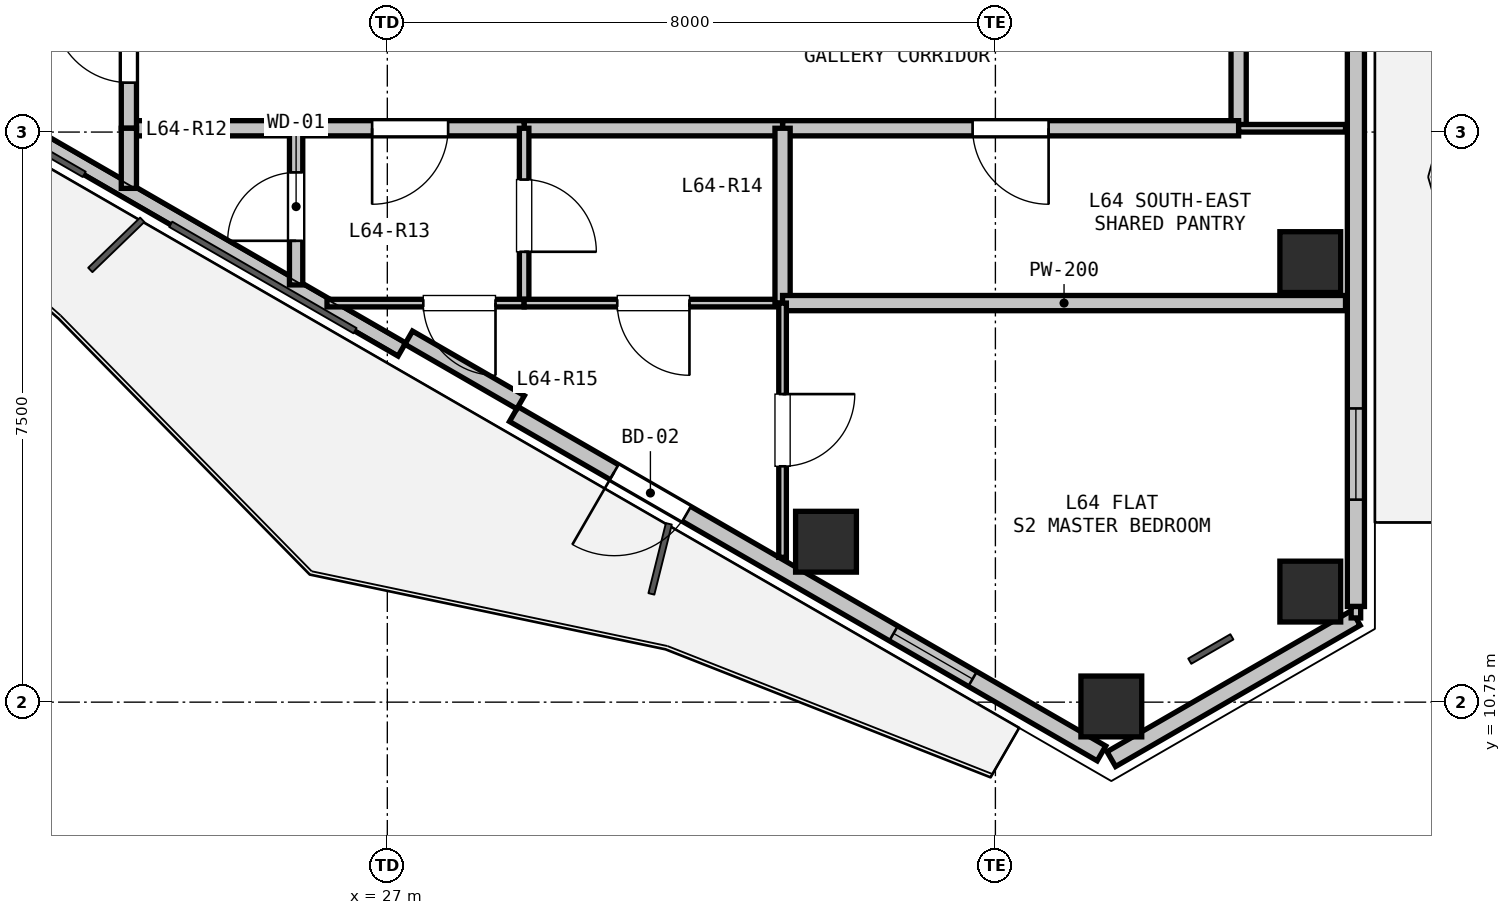
"""IFC4 building model, lengths in metres.
Left out: names, types, materials, properties, quantities, classifications, styles, units other than length and angle.
Written with IfcOpenShell. Run it as: python <this file> out.ifc"""

import sys

from ifc_helpers import new_model, si_unit, direction, frame, frame_2d, origin, origin_2d, place, context, subcontext, project, spatial, rectangle, hollow_rectangle, extrude, element, fill, save


model = new_model("IFC4")
c1 = context("Model", 3, precision=1e-05, world=origin(), true_north=direction((0.0, 1.0)))
c2 = subcontext(c1, "Body", "Model", "MODEL_VIEW")
j1 = project(units=[si_unit("LENGTHUNIT", "METRE"), si_unit("PLANEANGLEUNIT", "RADIAN")], contexts=[c1])
p1 = place(None, origin())
s1 = spatial("IfcSite", under=j1, at=p1, CompositionType="ELEMENT")
p2 = place(p1, origin())
s2 = spatial("IfcBuilding", under=s1, at=p2, CompositionType="ELEMENT")
p3 = place(p2, frame((0.0, 0.0, 229.8)))
s3 = spatial("IfcBuildingStorey", under=s2, at=p3, CompositionType="ELEMENT", Elevation=229.8)
for number, where, z_axis, x_axis in (
    (1, (39.143, 16.539, 0.0), (0.0, 0.0, 1.0), (1.0, 0.0, 0.0)),
    (2, (39.143, 12.205, 0.0), (0.0, 0.0, 1.0), (1.0, 0.0, 0.0)),
    (3, (36.525, 10.693, 0.0), (0.0, 0.0, 1.0), (1.0, 0.0, 0.0)),
    (4, (32.771, 12.861, 0.0), (0.0, 0.0, 1.0), (1.0, 0.0, 0.0)),
):
    element("IfcColumn", number, at=place(p3, frame(where, z_axis=z_axis, x_axis=x_axis)), inside=s3, PredefinedType="COLUMN", context=c2, shape_type="SweptSolid", body=[
        extrude(hollow_rectangle(XDim=0.8, YDim=0.8, WallThickness=0.025, at=origin_2d()), origin(), (0.0, 0.0, 1.0), 3.3),
    ])
p4 = place(p3, frame((39.743, 11.858, 0.0), z_axis=(0.0, 0.0, 1.0), x_axis=(-0.866038962515, -0.499976514854, 0.0)))
e5 = element("IfcWall", 5, at=p4, inside=s3, PredefinedType="SOLIDWALL", context=c2, shape_type="SweptSolid", body=[
    extrude(rectangle(XDim=3.716, YDim=0.225, at=frame_2d((1.858, 0.0))), origin(), (0.0, 0.0, 1.0), 2.7),
])
p5 = place(p3, frame((39.743, 20.936, 0.0), z_axis=(0.0, 0.0, 1.0), x_axis=(0.0, -1.0, 0.0)))
e6 = element("IfcWall", 6, at=p5, inside=s3, PredefinedType="SOLIDWALL", context=c2, shape_type="SweptSolid", body=[
    extrude(rectangle(XDim=8.928, YDim=0.225, at=frame_2d((4.464, 0.0))), origin(), (0.0, 0.0, 1.0), 2.7),
])
p6 = place(p5, frame((6.322, 0.0, 0.9)))
e7 = element("IfcOpeningElement", 7, at=p6, cuts=e6, PredefinedType="OPENING", context=c2, shape_type="SweptSolid", body=[
    extrude(rectangle(XDim=1.2, YDim=1.4, at=frame_2d((0.6, 0.7))), frame((0.0, 0.123, 0.0), z_axis=(0.0, -1.0, 0.0), x_axis=(1.0, 0.0, 0.0)), (0.0, 0.0, 1.0), 0.245),
])
p7 = place(p3, frame((36.395, 10.076, 0.0), z_axis=(0.0, 0.0, 1.0), x_axis=(-0.866026655105, 0.499997832642, 0.0)))
e8 = element("IfcWall", 8, at=p7, inside=s3, PredefinedType="SOLIDWALL", context=c2, shape_type="SweptSolid", body=[
    extrude(rectangle(XDim=8.928, YDim=0.225, at=frame_2d((4.464, 0.0))), origin(), (0.0, 0.0, 1.0), 2.7),
])
p8 = place(p7, frame((6.302, 0.0, 0.0)))
e9 = element("IfcOpeningElement", 9, at=p8, cuts=e8, PredefinedType="OPENING", context=c2, shape_type="SweptSolid", body=[
    extrude(rectangle(XDim=1.1, YDim=2.1, at=frame_2d((0.55, 1.05))), frame((0.0, 0.123, 0.0), z_axis=(0.0, -1.0, 0.0), x_axis=(1.0, 0.0, 0.0)), (0.0, 0.0, 1.0), 0.245),
])
p9 = place(p7, frame((1.958, 0.0, 0.9)))
e10 = element("IfcOpeningElement", 10, at=p9, cuts=e8, PredefinedType="OPENING", context=c2, shape_type="SweptSolid", body=[
    extrude(rectangle(XDim=1.2, YDim=1.4, at=frame_2d((0.6, 0.7))), frame((0.0, 0.123, 0.0), z_axis=(0.0, -1.0, 0.0), x_axis=(1.0, 0.0, 0.0)), (0.0, 0.0, 1.0), 0.245),
])
p10 = place(p3, frame((27.191, 15.389, 0.0), z_axis=(0.0, 0.0, 1.0), x_axis=(-0.866019557082, 0.500010126649, 0.0)))
e11 = element("IfcWall", 11, at=p10, inside=s3, PredefinedType="PARAPET", context=c2, shape_type="SweptSolid", body=[
    extrude(rectangle(XDim=8.228, YDim=0.2, at=frame_2d((4.114, 0.0))), origin(), (0.0, 0.0, 1.0), 0.2),
])
p11 = place(p3, frame((28.754, 14.695, 0.0), z_axis=(0.0, 0.0, 1.0), x_axis=(-0.866025371046, 0.500000056704, 0.0)))
e12 = element("IfcWall", 12, at=p11, inside=s3, PredefinedType="PARAPET", context=c2, shape_type="SweptSolid", body=[
    extrude(rectangle(XDim=1.7, YDim=0.2, at=frame_2d((0.85, 0.0))), origin(), (0.0, 0.0, 1.0), 2.7),
])
p12 = place(p3, frame((38.2, 20.75, 0.0), z_axis=(0.0, 0.0, 1.0), x_axis=(0.0, -1.0, 0.0)))
e13 = element("IfcWall", 13, at=p12, inside=s3, PredefinedType="PARTITIONING", context=c2, shape_type="SweptSolid", body=[
    extrude(rectangle(XDim=2.45, YDim=0.2, at=frame_2d((1.225, 0.0))), origin(), (0.0, 0.0, 1.0), 3.08),
])
p13 = place(p3, frame((38.2, 18.3, 0.0), z_axis=(0.0, 0.0, 1.0), x_axis=(-1.0, 0.0, 0.0)))
e14 = element("IfcWall", 14, at=p13, inside=s3, PredefinedType="PARTITIONING", context=c2, shape_type="SweptSolid", body=[
    extrude(rectangle(XDim=6.0, YDim=0.2, at=frame_2d((3.0, 0.0))), origin(), (0.0, 0.0, 1.0), 2.528),
])
p14 = place(p13, frame((2.5, 0.0, 0.0)))
e15 = element("IfcOpeningElement", 15, at=p14, cuts=e14, PredefinedType="OPENING", context=c2, shape_type="SweptSolid", body=[
    extrude(rectangle(XDim=1.0, YDim=2.15, at=frame_2d((0.5, 1.075))), frame((0.0, 0.11, 0.0), z_axis=(0.0, -1.0, 0.0), x_axis=(1.0, 0.0, 0.0)), (0.0, 0.0, 1.0), 0.22),
])
p15 = place(p3, frame((32.2, 18.3, 0.0), z_axis=(0.0, 0.0, 1.0), x_axis=(-1.0, 0.0, 0.0)))
e16 = element("IfcWall", 16, at=p15, inside=s3, PredefinedType="PARTITIONING", context=c2, shape_type="SweptSolid", body=[
    extrude(rectangle(XDim=3.4, YDim=0.2, at=frame_2d((1.7, 0.0))), origin(), (0.0, 0.0, 1.0), 3.08),
])
p16 = place(p3, frame((28.8, 18.3, 0.0), z_axis=(0.0, 0.0, 1.0), x_axis=(-1.0, 0.0, 0.0)))
e17 = element("IfcWall", 17, at=p16, inside=s3, PredefinedType="PARTITIONING", context=c2, shape_type="SweptSolid", body=[
    extrude(rectangle(XDim=3.0, YDim=0.2, at=frame_2d((1.5, 0.0))), origin(), (0.0, 0.0, 1.0), 3.08),
])
p17 = place(p16, frame((1.0, 0.0, 0.0)))
e18 = element("IfcOpeningElement", 18, at=p17, cuts=e17, PredefinedType="OPENING", context=c2, shape_type="SweptSolid", body=[
    extrude(rectangle(XDim=1.0, YDim=2.15, at=frame_2d((0.5, 1.075))), frame((0.0, 0.11, 0.0), z_axis=(0.0, -1.0, 0.0), x_axis=(1.0, 0.0, 0.0)), (0.0, 0.0, 1.0), 0.22),
])
p18 = place(p3, frame((25.8, 18.3, 0.0), z_axis=(0.0, 0.0, 1.0), x_axis=(-1.0, 0.0, 0.0)))
e19 = element("IfcWall", 19, at=p18, inside=s3, PredefinedType="PARTITIONING", context=c2, shape_type="SweptSolid", body=[
    extrude(rectangle(XDim=2.2, YDim=0.2, at=frame_2d((1.1, 0.0))), origin(), (0.0, 0.0, 1.0), 2.365),
])
p19 = place(p3, frame((23.6, 18.3, 0.0), z_axis=(0.0, 0.0, 1.0), x_axis=(0.0, 1.0, 0.0)))
e20 = element("IfcWall", 20, at=p19, inside=s3, PredefinedType="PARTITIONING", context=c2, shape_type="SweptSolid", body=[
    extrude(rectangle(XDim=2.2, YDim=0.2, at=frame_2d((1.1, 0.0))), origin(), (0.0, 0.0, 1.0), 2.528),
])
p20 = place(p19, frame((0.6, 0.0, 0.0)))
e21 = element("IfcOpeningElement", 21, at=p20, cuts=e20, PredefinedType="OPENING", context=c2, shape_type="SweptSolid", body=[
    extrude(rectangle(XDim=1.0, YDim=2.15, at=frame_2d((0.5, 1.075))), frame((0.0, 0.11, 0.0), z_axis=(0.0, -1.0, 0.0), x_axis=(1.0, 0.0, 0.0)), (0.0, 0.0, 1.0), 0.22),
])
p21 = place(p3, frame((28.8, 18.3, 0.0), z_axis=(0.0, 0.0, 1.0), x_axis=(0.0, -1.0, 0.0)))
e22 = element("IfcWall", 22, at=p21, inside=s3, PredefinedType="PARTITIONING", context=c2, shape_type="SweptSolid", body=[
    extrude(rectangle(XDim=2.3, YDim=0.125, at=frame_2d((1.15, 0.0))), origin(), (0.0, 0.0, 1.0), 3.08),
])
p22 = place(p21, frame((0.675, 0.0, 0.0)))
e23 = element("IfcOpeningElement", 23, at=p22, cuts=e22, PredefinedType="OPENING", context=c2, shape_type="SweptSolid", body=[
    extrude(rectangle(XDim=0.95, YDim=2.1, at=frame_2d((0.475, 1.05))), frame((0.0, 0.073, 0.0), z_axis=(0.0, -1.0, 0.0), x_axis=(1.0, 0.0, 0.0)), (0.0, 0.0, 1.0), 0.145),
])
p23 = place(p3, frame((28.8, 16.0, 0.0), z_axis=(0.0, 0.0, 1.0), x_axis=(-1.0, 0.0, 0.0)))
e24 = element("IfcWall", 24, at=p23, inside=s3, PredefinedType="PARTITIONING", context=c2, shape_type="SweptSolid", body=[
    extrude(rectangle(XDim=2.594, YDim=0.1, at=frame_2d((1.297, 0.0))), origin(), (0.0, 0.0, 1.0), 2.365),
])
p24 = place(p23, frame((0.377, 0.0, 0.0)))
e25 = element("IfcOpeningElement", 25, at=p24, cuts=e24, PredefinedType="OPENING", context=c2, shape_type="SweptSolid", body=[
    extrude(rectangle(XDim=0.95, YDim=2.1, at=frame_2d((0.475, 1.05))), frame((0.0, 0.06, 0.0), z_axis=(0.0, -1.0, 0.0), x_axis=(1.0, 0.0, 0.0)), (0.0, 0.0, 1.0), 0.12),
])
p25 = place(p3, frame((25.8, 16.239, 0.0), z_axis=(0.0, 0.0, 1.0), x_axis=(0.0, 1.0, 0.0)))
e26 = element("IfcWall", 26, at=p25, inside=s3, PredefinedType="PLUMBINGWALL", context=c2, shape_type="SweptSolid", body=[
    extrude(rectangle(XDim=2.061, YDim=0.175, at=frame_2d((1.031, 0.0))), origin(), (0.0, 0.0, 1.0), 2.365),
])
p26 = place(p25, frame((0.581, 0.0, 0.0)))
e27 = element("IfcOpeningElement", 27, at=p26, cuts=e26, PredefinedType="OPENING", context=c2, shape_type="SweptSolid", body=[
    extrude(rectangle(XDim=0.9, YDim=2.1, at=frame_2d((0.45, 1.05))), frame((0.0, 0.097, 0.0), z_axis=(0.0, -1.0, 0.0), x_axis=(1.0, 0.0, 0.0)), (0.0, 0.0, 1.0), 0.195),
])
p27 = place(p3, frame((23.6, 17.509, 0.0), z_axis=(0.0, 0.0, 1.0), x_axis=(0.0, 1.0, 0.0)))
e28 = element("IfcWall", 28, at=p27, inside=s3, PredefinedType="PARTITIONING", context=c2, shape_type="SweptSolid", body=[
    extrude(rectangle(XDim=0.791, YDim=0.2, at=frame_2d((0.396, 0.0))), origin(), (0.0, 0.0, 1.0), 2.365),
])
p28 = place(p3, frame((32.2, 16.0, 0.0), z_axis=(0.0, 0.0, 1.0), x_axis=(-1.0, 0.0, 0.0)))
e29 = element("IfcWall", 29, at=p28, inside=s3, PredefinedType="PARTITIONING", context=c2, shape_type="SweptSolid", body=[
    extrude(rectangle(XDim=3.4, YDim=0.1, at=frame_2d((1.7, 0.0))), origin(), (0.0, 0.0, 1.0), 3.08),
])
p29 = place(p28, frame((1.225, 0.0, 0.0)))
e30 = element("IfcOpeningElement", 30, at=p29, cuts=e29, PredefinedType="OPENING", context=c2, shape_type="SweptSolid", body=[
    extrude(rectangle(XDim=0.95, YDim=2.1, at=frame_2d((0.475, 1.05))), frame((0.0, 0.06, 0.0), z_axis=(0.0, -1.0, 0.0), x_axis=(1.0, 0.0, 0.0)), (0.0, 0.0, 1.0), 0.12),
])
p30 = place(p3, frame((32.2, 18.3, 0.0), z_axis=(0.0, 0.0, 1.0), x_axis=(0.0, -1.0, 0.0)))
e31 = element("IfcWall", 31, at=p30, inside=s3, PredefinedType="PARTITIONING", context=c2, shape_type="SweptSolid", body=[
    extrude(rectangle(XDim=2.3, YDim=0.2, at=frame_2d((1.15, 0.0))), origin(), (0.0, 0.0, 1.0), 3.08),
])
p31 = place(p3, frame((38.2, 18.3, 0.0), z_axis=(0.0, 0.0, 1.0), x_axis=(1.0, 0.0, 0.0)))
e32 = element("IfcWall", 32, at=p31, inside=s3, PredefinedType="PARTITIONING", context=c2, shape_type="SweptSolid", body=[
    extrude(rectangle(XDim=1.406, YDim=0.1, at=frame_2d((0.703, 0.0))), origin(), (0.0, 0.0, 1.0), 2.365),
])
p32 = place(p3, frame((39.606, 16.0, 0.0), z_axis=(0.0, 0.0, 1.0), x_axis=(-1.0, 0.0, 0.0)))
e33 = element("IfcWall", 33, at=p32, inside=s3, PredefinedType="PARTITIONING", context=c2, shape_type="SweptSolid", body=[
    extrude(rectangle(XDim=7.406, YDim=0.2, at=frame_2d((3.703, 0.0))), origin(), (0.0, 0.0, 1.0), 2.528),
])
p33 = place(p3, frame((32.2, 16.0, 0.0), z_axis=(0.0, 0.0, 1.0), x_axis=(0.0, -1.0, 0.0)))
e34 = element("IfcWall", 34, at=p33, inside=s3, PredefinedType="PARTITIONING", context=c2, shape_type="SweptSolid", body=[
    extrude(rectangle(XDim=3.344, YDim=0.1, at=frame_2d((1.672, 0.0))), origin(), (0.0, 0.0, 1.0), 2.365),
])
p34 = place(p33, frame((1.197, 0.0, 0.0)))
e35 = element("IfcOpeningElement", 35, at=p34, cuts=e34, PredefinedType="OPENING", context=c2, shape_type="SweptSolid", body=[
    extrude(rectangle(XDim=0.95, YDim=2.1, at=frame_2d((0.475, 1.05))), frame((0.0, 0.06, 0.0), z_axis=(0.0, -1.0, 0.0), x_axis=(1.0, 0.0, 0.0)), (0.0, 0.0, 1.0), 0.12),
])
p35 = place(p3, frame((39.743, 12.008, 0.0), z_axis=(0.0, 0.0, 1.0), x_axis=(0.0, -1.0, 0.0)))
e36 = element("IfcWall", 36, at=p35, inside=s3, PredefinedType="PARTITIONING", context=c2, shape_type="SweptSolid", body=[
    extrude(rectangle(XDim=0.15, YDim=0.125, at=frame_2d((0.075, 0.0))), origin(), (0.0, 0.0, 1.0), 3.08),
])
p36 = place(p6, origin())
e37 = element("IfcWindow", 37, at=p36, inside=s3, PartitioningType="SINGLE_PANEL", PredefinedType="WINDOW", context=c2, shape_type="SweptSolid", body=[
    extrude(rectangle(XDim=1.2, YDim=1.4, at=frame_2d((0.6, 0.7))), frame((0.0, 0.03, 0.0), z_axis=(0.0, -1.0, 0.0), x_axis=(1.0, 0.0, 0.0)), (0.0, 0.0, 1.0), 0.06),
])
fill(e7, e37)
p37 = place(p8, origin())
e38 = element("IfcDoor", 38, at=p37, inside=s3, OperationType="SINGLE_SWING_RIGHT", PredefinedType="DOOR", context=c2, shape_type="SweptSolid", body=[
    extrude(rectangle(XDim=1.1, YDim=2.1, at=frame_2d((0.55, 1.05))), frame((0.0, 0.025, 0.0), z_axis=(0.0, -1.0, 0.0), x_axis=(1.0, 0.0, 0.0)), (0.0, 0.0, 1.0), 0.05),
])
fill(e9, e38)
p38 = place(p9, origin())
e39 = element("IfcWindow", 39, at=p38, inside=s3, PartitioningType="SINGLE_PANEL", PredefinedType="WINDOW", context=c2, shape_type="SweptSolid", body=[
    extrude(rectangle(XDim=1.2, YDim=1.4, at=frame_2d((0.6, 0.7))), frame((0.0, 0.03, 0.0), z_axis=(0.0, -1.0, 0.0), x_axis=(1.0, 0.0, 0.0)), (0.0, 0.0, 1.0), 0.06),
])
fill(e10, e39)
p39 = place(p17, origin())
e40 = element("IfcDoor", 40, at=p39, inside=s3, OperationType="SINGLE_SWING_RIGHT", PredefinedType="DOOR", context=c2, shape_type="SweptSolid", body=[
    extrude(rectangle(XDim=1.0, YDim=2.15, at=frame_2d((0.5, 1.075))), frame((0.0, 0.025, 0.0), z_axis=(0.0, -1.0, 0.0), x_axis=(1.0, 0.0, 0.0)), (0.0, 0.0, 1.0), 0.05),
])
fill(e18, e40)
p40 = place(p14, origin())
e41 = element("IfcDoor", 41, at=p40, inside=s3, OperationType="SINGLE_SWING_LEFT", PredefinedType="DOOR", context=c2, shape_type="SweptSolid", body=[
    extrude(rectangle(XDim=1.0, YDim=2.15, at=frame_2d((0.5, 1.075))), frame((0.0, 0.025, 0.0), z_axis=(0.0, -1.0, 0.0), x_axis=(1.0, 0.0, 0.0)), (0.0, 0.0, 1.0), 0.05),
])
fill(e15, e41)
p41 = place(p20, origin())
e42 = element("IfcDoor", 42, at=p41, inside=s3, OperationType="SINGLE_SWING_RIGHT", PredefinedType="DOOR", context=c2, shape_type="SweptSolid", body=[
    extrude(rectangle(XDim=1.0, YDim=2.15, at=frame_2d((0.5, 1.075))), frame((0.0, 0.025, 0.0), z_axis=(0.0, -1.0, 0.0), x_axis=(1.0, 0.0, 0.0)), (0.0, 0.0, 1.0), 0.05),
])
fill(e21, e42)
p42 = place(p26, origin())
e43 = element("IfcDoor", 43, at=p42, inside=s3, OperationType="SINGLE_SWING_LEFT", PredefinedType="DOOR", context=c2, shape_type="SweptSolid", body=[
    extrude(rectangle(XDim=0.9, YDim=2.1, at=frame_2d((0.45, 1.05))), frame((0.0, 0.025, 0.0), z_axis=(0.0, -1.0, 0.0), x_axis=(1.0, 0.0, 0.0)), (0.0, 0.0, 1.0), 0.05),
])
fill(e27, e43)
p43 = place(p22, origin())
e44 = element("IfcDoor", 44, at=p43, inside=s3, OperationType="SINGLE_SWING_RIGHT", PredefinedType="DOOR", context=c2, shape_type="SweptSolid", body=[
    extrude(rectangle(XDim=0.95, YDim=2.1, at=frame_2d((0.475, 1.05))), frame((0.0, 0.025, 0.0), z_axis=(0.0, -1.0, 0.0), x_axis=(1.0, 0.0, 0.0)), (0.0, 0.0, 1.0), 0.05),
])
fill(e23, e44)
p44 = place(p24, origin())
e45 = element("IfcDoor", 45, at=p44, inside=s3, OperationType="SINGLE_SWING_LEFT", PredefinedType="DOOR", context=c2, shape_type="SweptSolid", body=[
    extrude(rectangle(XDim=0.95, YDim=2.1, at=frame_2d((0.475, 1.05))), frame((0.0, 0.025, 0.0), z_axis=(0.0, -1.0, 0.0), x_axis=(1.0, 0.0, 0.0)), (0.0, 0.0, 1.0), 0.05),
])
fill(e25, e45)
p45 = place(p29, origin())
e46 = element("IfcDoor", 46, at=p45, inside=s3, OperationType="SINGLE_SWING_LEFT", PredefinedType="DOOR", context=c2, shape_type="SweptSolid", body=[
    extrude(rectangle(XDim=0.95, YDim=2.1, at=frame_2d((0.475, 1.05))), frame((0.0, 0.025, 0.0), z_axis=(0.0, -1.0, 0.0), x_axis=(1.0, 0.0, 0.0)), (0.0, 0.0, 1.0), 0.05),
])
fill(e30, e46)
p46 = place(p34, origin())
e47 = element("IfcDoor", 47, at=p46, inside=s3, OperationType="SINGLE_SWING_LEFT", PredefinedType="DOOR", context=c2, shape_type="SweptSolid", body=[
    extrude(rectangle(XDim=0.95, YDim=2.1, at=frame_2d((0.475, 1.05))), frame((0.0, 0.025, 0.0), z_axis=(0.0, -1.0, 0.0), x_axis=(1.0, 0.0, 0.0)), (0.0, 0.0, 1.0), 0.05),
])
fill(e35, e47)
save(model, sys.argv[1])
